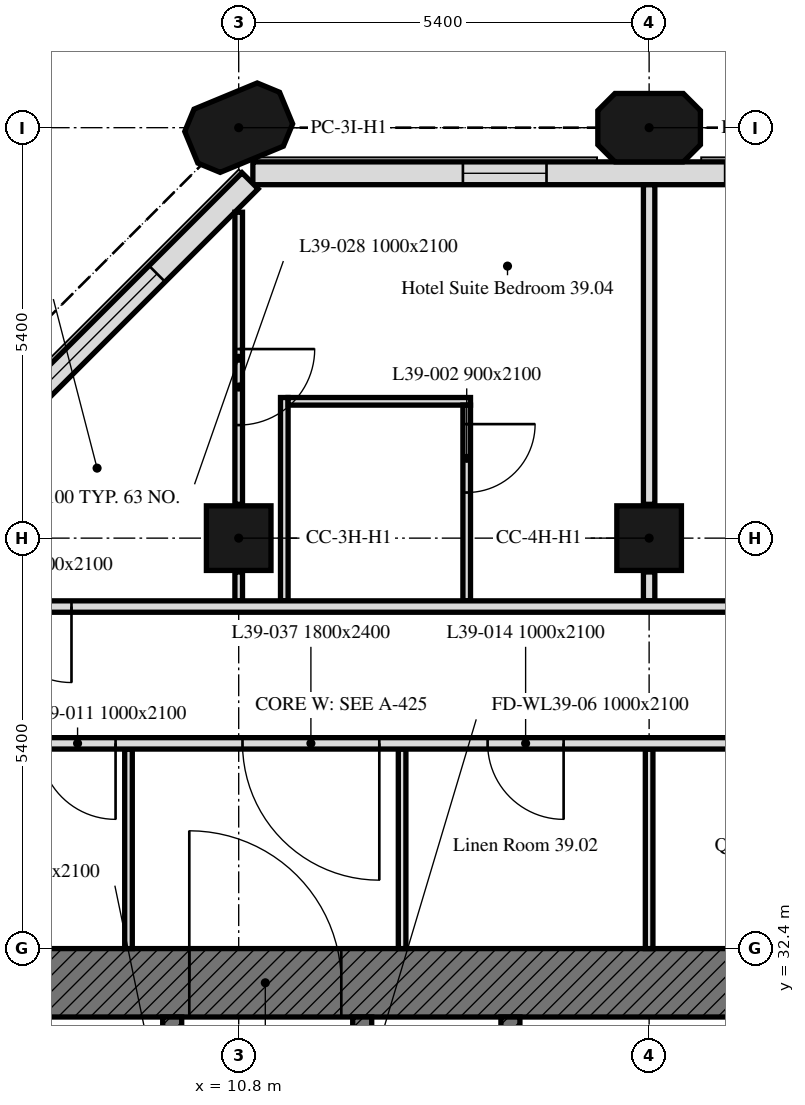
"""IFC4 building model, lengths in metres.
Left out: names, types, materials, properties, quantities, classifications, styles, units other than length and angle.
Written with IfcOpenShell. Run it as: python <this file> out.ifc"""

import sys

from ifc_helpers import new_model, si_unit, direction, frame, frame_2d, origin, origin_2d, place, context, subcontext, project, spatial, polyline, rectangle, outline, extrude, element, fill, save


model = new_model("IFC4")
c1 = context("Model", 3, precision=1e-05, world=origin(), true_north=direction((0.0, 1.0)))
c2 = subcontext(c1, "Body", "Model", "MODEL_VIEW")
j1 = project(units=[si_unit("LENGTHUNIT", "METRE"), si_unit("PLANEANGLEUNIT", "RADIAN")], contexts=[c1])
p1 = place(None, origin())
s1 = spatial("IfcSite", under=j1, at=p1, CompositionType="ELEMENT")
p2 = place(p1, origin())
s2 = spatial("IfcBuilding", under=s1, at=p2, CompositionType="ELEMENT")
p3 = place(p2, frame((0.0, 0.0, 166.0)))
s3 = spatial("IfcBuildingStorey", under=s2, at=p3, CompositionType="ELEMENT", Elevation=166.0)
for number, where, z_axis, x_axis in (
    (1, (10.8, 37.8, 0.0), (0.0, 0.0, 1.0), (1.0, 0.0, 0.0)),
    (2, (16.2, 37.8, 0.0), (0.0, 0.0, 1.0), (1.0, 0.0, 0.0)),
):
    element("IfcColumn", number, at=place(p3, frame(where, z_axis=z_axis, x_axis=x_axis)), inside=s3, PredefinedType="COLUMN", context=c2, shape_type="SweptSolid", body=[
        extrude(rectangle(XDim=0.85, YDim=0.85, at=origin_2d()), origin(), (0.0, 0.0, 1.0), 3.0),
    ])
for number, where, z_axis, x_axis in (
    (3, (10.8, 43.2, 0.0), (0.0, 0.0, 1.0), (0.924, 0.383, 0.0)),
    (4, (16.2, 43.2, 0.0), (0.0, 0.0, 1.0), (1.0, 0.0, 0.0)),
):
    element("IfcColumn", number, at=place(p3, frame(where, z_axis=z_axis, x_axis=x_axis)), inside=s3, PredefinedType="COLUMN", context=c2, shape_type="SweptSolid", body=[
        extrude(outline(polyline([(-0.45, -0.45), (0.45, -0.45), (0.675, -0.225), (0.675, 0.225), (0.45, 0.45), (-0.45, 0.45), (-0.675, 0.225), (-0.675, -0.225), (-0.45, -0.45)])), origin(), (0.0, 0.0, 1.0), 3.0),
    ])
p4 = place(p3, frame((43.014, 42.6, 0.0), z_axis=(0.0, 0.0, 1.0), x_axis=(-1.0, 0.0, 0.0)))
e5 = element("IfcWall", 5, at=p4, inside=s3, PredefinedType="SOLIDWALL", context=c2, shape_type="SweptSolid", body=[
    extrude(rectangle(XDim=32.027, YDim=0.3, at=frame_2d((16.014, 0.0))), origin(), (0.0, 0.0, 1.0), 3.0),
])
p5 = place(p4, frame((0.814, 0.0, 0.9)))
e6 = element("IfcOpeningElement", 6, at=p5, cuts=e5, PredefinedType="OPENING", context=c2, shape_type="SweptSolid", body=[
    extrude(rectangle(XDim=3.4, YDim=1.7, at=frame_2d((1.7, 0.85))), frame((0.0, 0.16, 0.0), z_axis=(0.0, -1.0, 0.0), x_axis=(1.0, 0.0, 0.0)), (0.0, 0.0, 1.0), 0.32),
])
p6 = place(p4, frame((6.564, 0.0, 0.9)))
e7 = element("IfcOpeningElement", 7, at=p6, cuts=e5, PredefinedType="OPENING", context=c2, shape_type="SweptSolid", body=[
    extrude(rectangle(XDim=1.1, YDim=1.7, at=frame_2d((0.55, 0.85))), frame((0.0, 0.16, 0.0), z_axis=(0.0, -1.0, 0.0), x_axis=(1.0, 0.0, 0.0)), (0.0, 0.0, 1.0), 0.32),
])
p7 = place(p4, frame((11.614, 0.0, 0.9)))
e8 = element("IfcOpeningElement", 8, at=p7, cuts=e5, PredefinedType="OPENING", context=c2, shape_type="SweptSolid", body=[
    extrude(rectangle(XDim=3.4, YDim=1.7, at=frame_2d((1.7, 0.85))), frame((0.0, 0.16, 0.0), z_axis=(0.0, -1.0, 0.0), x_axis=(1.0, 0.0, 0.0)), (0.0, 0.0, 1.0), 0.32),
])
p8 = place(p4, frame((17.364, 0.0, 0.9)))
e9 = element("IfcOpeningElement", 9, at=p8, cuts=e5, PredefinedType="OPENING", context=c2, shape_type="SweptSolid", body=[
    extrude(rectangle(XDim=1.1, YDim=1.7, at=frame_2d((0.55, 0.85))), frame((0.0, 0.16, 0.0), z_axis=(0.0, -1.0, 0.0), x_axis=(1.0, 0.0, 0.0)), (0.0, 0.0, 1.0), 0.32),
])
p9 = place(p4, frame((22.414, 0.0, 0.9)))
e10 = element("IfcOpeningElement", 10, at=p9, cuts=e5, PredefinedType="OPENING", context=c2, shape_type="SweptSolid", body=[
    extrude(rectangle(XDim=3.4, YDim=1.7, at=frame_2d((1.7, 0.85))), frame((0.0, 0.16, 0.0), z_axis=(0.0, -1.0, 0.0), x_axis=(1.0, 0.0, 0.0)), (0.0, 0.0, 1.0), 0.32),
])
p10 = place(p4, frame((28.164, 0.0, 0.9)))
e11 = element("IfcOpeningElement", 11, at=p10, cuts=e5, PredefinedType="OPENING", context=c2, shape_type="SweptSolid", body=[
    extrude(rectangle(XDim=1.1, YDim=1.7, at=frame_2d((0.55, 0.85))), frame((0.0, 0.16, 0.0), z_axis=(0.0, -1.0, 0.0), x_axis=(1.0, 0.0, 0.0)), (0.0, 0.0, 1.0), 0.32),
])
p11 = place(p3, frame((10.949, 42.501, 0.0), z_axis=(0.0, 0.0, 1.0), x_axis=(-0.707106781187, -0.707106781187, 0.0)))
e12 = element("IfcWall", 12, at=p11, inside=s3, PredefinedType="SOLIDWALL", context=c2, shape_type="SweptSolid", body=[
    extrude(rectangle(XDim=6.86, YDim=0.3, at=frame_2d((3.43, 0.0))), origin(), (0.0, 0.0, 1.0), 3.0),
])
p12 = place(p11, frame((1.73, 0.0, 0.9)))
e13 = element("IfcOpeningElement", 13, at=p12, cuts=e12, PredefinedType="OPENING", context=c2, shape_type="SweptSolid", body=[
    extrude(rectangle(XDim=3.4, YDim=1.7, at=frame_2d((1.7, 0.85))), frame((0.0, 0.16, 0.0), z_axis=(0.0, -1.0, 0.0), x_axis=(1.0, 0.0, 0.0)), (0.0, 0.0, 1.0), 0.32),
])
p13 = place(p3, frame((6.6, 31.95, 0.0), z_axis=(0.0, 0.0, 1.0), x_axis=(1.0, 0.0, 0.0)))
e14 = element("IfcWall", 14, at=p13, inside=s3, PredefinedType="SOLIDWALL", context=c2, shape_type="SweptSolid", body=[
    extrude(rectangle(XDim=11.1, YDim=0.9, at=frame_2d((5.55, 0.0))), origin(), (0.0, 0.0, 1.0), 3.0),
])
p14 = place(p13, frame((3.55, 0.0, 0.0)))
e15 = element("IfcOpeningElement", 15, at=p14, cuts=e14, PredefinedType="OPENING", context=c2, shape_type="SweptSolid", body=[
    extrude(rectangle(XDim=2.0, YDim=2.4, at=frame_2d((1.0, 1.2))), frame((0.0, 0.45, 0.0), z_axis=(0.0, -1.0, 0.0), x_axis=(1.0, 0.0, 0.0)), (0.0, 0.0, 1.0), 0.9),
])
p15 = place(p3, frame((9.925, 17.1, 0.0), z_axis=(0.0, 0.0, 1.0), x_axis=(0.0, 1.0, 0.0)))
e16 = element("IfcWall", 16, at=p15, inside=s3, PredefinedType="SOLIDWALL", context=c2, shape_type="SweptSolid", body=[
    extrude(rectangle(XDim=14.4, YDim=0.25, at=frame_2d((7.2, 0.0))), origin(), (0.0, 0.0, 1.0), 3.0),
])
p16 = place(p15, frame((4.6, 0.0, 0.0)))
e17 = element("IfcOpeningElement", 17, at=p16, cuts=e16, PredefinedType="OPENING", context=c2, shape_type="SweptSolid", body=[
    extrude(rectangle(XDim=1.0, YDim=2.1, at=frame_2d((0.5, 1.05))), frame((0.0, 0.125, 0.0), z_axis=(0.0, -1.0, 0.0), x_axis=(1.0, 0.0, 0.0)), (0.0, 0.0, 1.0), 0.25),
])
p17 = place(p15, frame((7.062, 0.0, 0.0)))
e18 = element("IfcOpeningElement", 18, at=p17, cuts=e16, PredefinedType="OPENING", context=c2, shape_type="SweptSolid", body=[
    extrude(rectangle(XDim=1.2, YDim=2.1, at=frame_2d((0.6, 1.05))), frame((0.0, 0.125, 0.0), z_axis=(0.0, -1.0, 0.0), x_axis=(1.0, 0.0, 0.0)), (0.0, 0.0, 1.0), 0.25),
])
p18 = place(p15, frame((10.106, 0.0, 0.0)))
e19 = element("IfcOpeningElement", 19, at=p18, cuts=e16, PredefinedType="OPENING", context=c2, shape_type="SweptSolid", body=[
    extrude(rectangle(XDim=0.9, YDim=2.1, at=frame_2d((0.45, 1.05))), frame((0.0, 0.125, 0.0), z_axis=(0.0, -1.0, 0.0), x_axis=(1.0, 0.0, 0.0)), (0.0, 0.0, 1.0), 0.25),
])
p19 = place(p15, frame((12.048, 0.0, 0.0)))
e20 = element("IfcOpeningElement", 20, at=p19, cuts=e16, PredefinedType="OPENING", context=c2, shape_type="SweptSolid", body=[
    extrude(rectangle(XDim=0.9, YDim=2.1, at=frame_2d((0.45, 1.05))), frame((0.0, 0.125, 0.0), z_axis=(0.0, -1.0, 0.0), x_axis=(1.0, 0.0, 0.0)), (0.0, 0.0, 1.0), 0.25),
])
p20 = place(p15, frame((13.354, 0.0, 0.0)))
e21 = element("IfcOpeningElement", 21, at=p20, cuts=e16, PredefinedType="OPENING", context=c2, shape_type="SweptSolid", body=[
    extrude(rectangle(XDim=0.9, YDim=2.1, at=frame_2d((0.45, 1.05))), frame((0.0, 0.125, 0.0), z_axis=(0.0, -1.0, 0.0), x_axis=(1.0, 0.0, 0.0)), (0.0, 0.0, 1.0), 0.25),
])
p21 = place(p3, frame((14.375, 17.1, 0.0), z_axis=(0.0, 0.0, 1.0), x_axis=(0.0, 1.0, 0.0)))
e22 = element("IfcWall", 22, at=p21, inside=s3, PredefinedType="SOLIDWALL", context=c2, shape_type="SweptSolid", body=[
    extrude(rectangle(XDim=14.4, YDim=0.25, at=frame_2d((7.2, 0.0))), origin(), (0.0, 0.0, 1.0), 3.0),
])
p22 = place(p21, frame((13.15, 0.0, 0.0)))
e23 = element("IfcOpeningElement", 23, at=p22, cuts=e22, PredefinedType="OPENING", context=c2, shape_type="SweptSolid", body=[
    extrude(rectangle(XDim=1.0, YDim=2.1, at=frame_2d((0.5, 1.05))), frame((0.0, 0.125, 0.0), z_axis=(0.0, -1.0, 0.0), x_axis=(1.0, 0.0, 0.0)), (0.0, 0.0, 1.0), 0.25),
])
p23 = place(p21, frame((0.6, 0.0, 0.0)))
e24 = element("IfcOpeningElement", 24, at=p23, cuts=e22, PredefinedType="OPENING", context=c2, shape_type="SweptSolid", body=[
    extrude(rectangle(XDim=1.1, YDim=2.1, at=frame_2d((0.55, 1.05))), frame((0.0, 0.125, 0.0), z_axis=(0.0, -1.0, 0.0), x_axis=(1.0, 0.0, 0.0)), (0.0, 0.0, 1.0), 0.25),
])
p24 = place(p21, frame((3.25, 0.0, 0.0)))
e25 = element("IfcOpeningElement", 25, at=p24, cuts=e22, PredefinedType="OPENING", context=c2, shape_type="SweptSolid", body=[
    extrude(rectangle(XDim=0.9, YDim=2.1, at=frame_2d((0.45, 1.05))), frame((0.0, 0.125, 0.0), z_axis=(0.0, -1.0, 0.0), x_axis=(1.0, 0.0, 0.0)), (0.0, 0.0, 1.0), 0.25),
])
p25 = place(p3, frame((12.425, 29.4, 0.0), z_axis=(0.0, 0.0, 1.0), x_axis=(0.0, 1.0, 0.0)))
e26 = element("IfcWall", 26, at=p25, inside=s3, PredefinedType="SOLIDWALL", context=c2, shape_type="SweptSolid", body=[
    extrude(rectangle(XDim=2.1, YDim=0.25, at=frame_2d((1.05, 0.0))), origin(), (0.0, 0.0, 1.0), 3.0),
])
p26 = place(p25, frame((0.5, 0.0, 0.0)))
e27 = element("IfcOpeningElement", 27, at=p26, cuts=e26, PredefinedType="OPENING", context=c2, shape_type="SweptSolid", body=[
    extrude(rectangle(XDim=1.0, YDim=2.1, at=frame_2d((0.5, 1.05))), frame((0.0, 0.125, 0.0), z_axis=(0.0, -1.0, 0.0), x_axis=(1.0, 0.0, 0.0)), (0.0, 0.0, 1.0), 0.25),
])
p27 = place(p3, frame((10.8, 42.088, 0.0), z_axis=(0.0, 0.0, 1.0), x_axis=(0.0, -1.0, 0.0)))
e28 = element("IfcWall", 28, at=p27, inside=s3, PredefinedType="PARTITIONING", context=c2, shape_type="SweptSolid", body=[
    extrude(rectangle(XDim=3.843, YDim=0.1, at=frame_2d((1.921, 0.0))), origin(), (0.0, 0.0, 1.0), 3.0),
])
p28 = place(p27, frame((1.8, 0.0, 0.0)))
e29 = element("IfcOpeningElement", 29, at=p28, cuts=e28, PredefinedType="OPENING", context=c2, shape_type="SweptSolid", body=[
    extrude(rectangle(XDim=1.0, YDim=2.1, at=frame_2d((0.5, 1.05))), frame((0.0, 0.05, 0.0), z_axis=(0.0, -1.0, 0.0), x_axis=(1.0, 0.0, 0.0)), (0.0, 0.0, 1.0), 0.1),
])
p29 = place(p3, frame((10.8, 37.355, 0.0), z_axis=(0.0, 0.0, 1.0), x_axis=(0.0, -1.0, 0.0)))
e30 = element("IfcWall", 30, at=p29, inside=s3, PredefinedType="PARTITIONING", context=c2, shape_type="SweptSolid", body=[
    extrude(rectangle(XDim=0.38, YDim=0.1, at=frame_2d((0.19, 0.0))), origin(), (0.0, 0.0, 1.0), 3.0),
])
p30 = place(p3, frame((11.4, 36.975, 0.0), z_axis=(0.0, 0.0, 1.0), x_axis=(0.0, 1.0, 0.0)))
e31 = element("IfcWall", 31, at=p30, inside=s3, PredefinedType="PARTITIONING", context=c2, shape_type="SweptSolid", body=[
    extrude(rectangle(XDim=2.675, YDim=0.1, at=frame_2d((1.337, 0.0))), origin(), (0.0, 0.0, 1.0), 3.0),
])
p31 = place(p3, frame((11.45, 39.6, 0.0), z_axis=(0.0, 0.0, 1.0), x_axis=(1.0, 0.0, 0.0)))
e32 = element("IfcWall", 32, at=p31, inside=s3, PredefinedType="PARTITIONING", context=c2, shape_type="SweptSolid", body=[
    extrude(rectangle(XDim=2.4, YDim=0.1, at=frame_2d((1.2, 0.0))), origin(), (0.0, 0.0, 1.0), 3.0),
])
p32 = place(p3, frame((13.8, 39.55, 0.0), z_axis=(0.0, 0.0, 1.0), x_axis=(0.0, -1.0, 0.0)))
e33 = element("IfcWall", 33, at=p32, inside=s3, PredefinedType="PARTITIONING", context=c2, shape_type="SweptSolid", body=[
    extrude(rectangle(XDim=2.575, YDim=0.1, at=frame_2d((1.288, 0.0))), origin(), (0.0, 0.0, 1.0), 3.0),
])
p33 = place(p32, frame((0.25, 0.0, 0.0)))
e34 = element("IfcOpeningElement", 34, at=p33, cuts=e33, PredefinedType="OPENING", context=c2, shape_type="SweptSolid", body=[
    extrude(rectangle(XDim=0.9, YDim=2.1, at=frame_2d((0.45, 1.05))), frame((0.0, 0.05, 0.0), z_axis=(0.0, -1.0, 0.0), x_axis=(1.0, 0.0, 0.0)), (0.0, 0.0, 1.0), 0.1),
])
p34 = place(p3, frame((16.2, 36.975, 0.0), z_axis=(0.0, 0.0, 1.0), x_axis=(0.0, 1.0, 0.0)))
e35 = element("IfcWall", 35, at=p34, inside=s3, PredefinedType="PARTITIONING", context=c2, shape_type="SweptSolid", body=[
    extrude(rectangle(XDim=0.38, YDim=0.15, at=frame_2d((0.19, 0.0))), origin(), (0.0, 0.0, 1.0), 3.0),
])
p35 = place(p3, frame((16.2, 38.245, 0.0), z_axis=(0.0, 0.0, 1.0), x_axis=(0.0, 1.0, 0.0)))
e36 = element("IfcWall", 36, at=p35, inside=s3, PredefinedType="PARTITIONING", context=c2, shape_type="SweptSolid", body=[
    extrude(rectangle(XDim=4.204, YDim=0.15, at=frame_2d((2.102, 0.0))), origin(), (0.0, 0.0, 1.0), 3.0),
])
p36 = place(p3, frame((47.849, 36.9, 0.0), z_axis=(0.0, 0.0, 1.0), x_axis=(-1.0, 0.0, 0.0)))
e37 = element("IfcWall", 37, at=p36, inside=s3, PredefinedType="PARTITIONING", context=c2, shape_type="SweptSolid", body=[
    extrude(rectangle(XDim=41.698, YDim=0.15, at=frame_2d((20.849, 0.0))), origin(), (0.0, 0.0, 1.0), 3.0),
])
p37 = place(p36, frame((39.249, 0.0, 0.0)))
e38 = element("IfcOpeningElement", 38, at=p37, cuts=e37, PredefinedType="OPENING", context=c2, shape_type="SweptSolid", body=[
    extrude(rectangle(XDim=1.0, YDim=2.1, at=frame_2d((0.5, 1.05))), frame((0.0, 0.075, 0.0), z_axis=(0.0, -1.0, 0.0), x_axis=(1.0, 0.0, 0.0)), (0.0, 0.0, 1.0), 0.15),
])
p38 = place(p36, frame((28.449, 0.0, 0.0)))
e39 = element("IfcOpeningElement", 39, at=p38, cuts=e37, PredefinedType="OPENING", context=c2, shape_type="SweptSolid", body=[
    extrude(rectangle(XDim=1.0, YDim=2.1, at=frame_2d((0.5, 1.05))), frame((0.0, 0.075, 0.0), z_axis=(0.0, -1.0, 0.0), x_axis=(1.0, 0.0, 0.0)), (0.0, 0.0, 1.0), 0.15),
])
p39 = place(p36, frame((16.849, 0.0, 0.0)))
e40 = element("IfcOpeningElement", 40, at=p39, cuts=e37, PredefinedType="OPENING", context=c2, shape_type="SweptSolid", body=[
    extrude(rectangle(XDim=1.0, YDim=2.1, at=frame_2d((0.5, 1.05))), frame((0.0, 0.075, 0.0), z_axis=(0.0, -1.0, 0.0), x_axis=(1.0, 0.0, 0.0)), (0.0, 0.0, 1.0), 0.15),
])
p40 = place(p36, frame((11.449, 0.0, 0.0)))
e41 = element("IfcOpeningElement", 41, at=p40, cuts=e37, PredefinedType="OPENING", context=c2, shape_type="SweptSolid", body=[
    extrude(rectangle(XDim=1.0, YDim=2.1, at=frame_2d((0.5, 1.05))), frame((0.0, 0.075, 0.0), z_axis=(0.0, -1.0, 0.0), x_axis=(1.0, 0.0, 0.0)), (0.0, 0.0, 1.0), 0.15),
])
p41 = place(p36, frame((2.744, 0.0, 0.0)))
e42 = element("IfcOpeningElement", 42, at=p41, cuts=e37, PredefinedType="OPENING", context=c2, shape_type="SweptSolid", body=[
    extrude(rectangle(XDim=1.0, YDim=2.1, at=frame_2d((0.5, 1.05))), frame((0.0, 0.075, 0.0), z_axis=(0.0, -1.0, 0.0), x_axis=(1.0, 0.0, 0.0)), (0.0, 0.0, 1.0), 0.15),
])
for number, where, z_axis, x_axis in (
    (43, (16.2, 35.025, 0.0), (0.0, 0.0, 1.0), (0.0, -1.0, 0.0)),
    (44, (9.35, 35.025, 0.0), (0.0, 0.0, 1.0), (0.0, -1.0, 0.0)),
    (45, (12.95, 32.4, 0.0), (0.0, 0.0, 1.0), (0.0, 1.0, 0.0)),
):
    element("IfcWall", number, at=place(p3, frame(where, z_axis=z_axis, x_axis=x_axis)), inside=s3, PredefinedType="PARTITIONING", context=c2, shape_type="SweptSolid", body=[
        extrude(rectangle(XDim=2.625, YDim=0.1, at=frame_2d((1.312, 0.0))), origin(), (0.0, 0.0, 1.0), 3.0),
    ])
p42 = place(p3, frame((43.275, 35.1, 0.0), z_axis=(0.0, 0.0, 1.0), x_axis=(-1.0, 0.0, 0.0)))
e46 = element("IfcWall", 46, at=p42, inside=s3, PredefinedType="PARTITIONING", context=c2, shape_type="SweptSolid", body=[
    extrude(rectangle(XDim=37.124, YDim=0.15, at=frame_2d((18.562, 0.0))), origin(), (0.0, 0.0, 1.0), 3.0),
])
p43 = place(p42, frame((24.775, 0.0, 0.0)))
e47 = element("IfcOpeningElement", 47, at=p43, cuts=e46, PredefinedType="OPENING", context=c2, shape_type="SweptSolid", body=[
    extrude(rectangle(XDim=1.0, YDim=2.1, at=frame_2d((0.5, 1.05))), frame((0.0, 0.075, 0.0), z_axis=(0.0, -1.0, 0.0), x_axis=(1.0, 0.0, 0.0)), (0.0, 0.0, 1.0), 0.15),
])
p44 = place(p42, frame((18.475, 0.0, 0.0)))
e48 = element("IfcOpeningElement", 48, at=p44, cuts=e46, PredefinedType="OPENING", context=c2, shape_type="SweptSolid", body=[
    extrude(rectangle(XDim=1.0, YDim=2.1, at=frame_2d((0.5, 1.05))), frame((0.0, 0.075, 0.0), z_axis=(0.0, -1.0, 0.0), x_axis=(1.0, 0.0, 0.0)), (0.0, 0.0, 1.0), 0.15),
])
p45 = place(p42, frame((13.525, 0.0, 0.0)))
e49 = element("IfcOpeningElement", 49, at=p45, cuts=e46, PredefinedType="OPENING", context=c2, shape_type="SweptSolid", body=[
    extrude(rectangle(XDim=1.0, YDim=2.1, at=frame_2d((0.5, 1.05))), frame((0.0, 0.075, 0.0), z_axis=(0.0, -1.0, 0.0), x_axis=(1.0, 0.0, 0.0)), (0.0, 0.0, 1.0), 0.15),
])
p46 = place(p42, frame((34.095, 0.0, 0.0)))
e50 = element("IfcOpeningElement", 50, at=p46, cuts=e46, PredefinedType="OPENING", context=c2, shape_type="SweptSolid", body=[
    extrude(rectangle(XDim=1.0, YDim=2.1, at=frame_2d((0.5, 1.05))), frame((0.0, 0.075, 0.0), z_axis=(0.0, -1.0, 0.0), x_axis=(1.0, 0.0, 0.0)), (0.0, 0.0, 1.0), 0.15),
])
p47 = place(p42, frame((8.75, 0.0, 0.0)))
e51 = element("IfcOpeningElement", 51, at=p47, cuts=e46, PredefinedType="OPENING", context=c2, shape_type="SweptSolid", body=[
    extrude(rectangle(XDim=1.0, YDim=2.1, at=frame_2d((0.5, 1.05))), frame((0.0, 0.075, 0.0), z_axis=(0.0, -1.0, 0.0), x_axis=(1.0, 0.0, 0.0)), (0.0, 0.0, 1.0), 0.15),
])
p48 = place(p42, frame((1.55, 0.0, 0.0)))
e52 = element("IfcOpeningElement", 52, at=p48, cuts=e46, PredefinedType="OPENING", context=c2, shape_type="SweptSolid", body=[
    extrude(rectangle(XDim=1.0, YDim=2.1, at=frame_2d((0.5, 1.05))), frame((0.0, 0.075, 0.0), z_axis=(0.0, -1.0, 0.0), x_axis=(1.0, 0.0, 0.0)), (0.0, 0.0, 1.0), 0.15),
])
p49 = place(p42, frame((28.2, 0.0, 0.0)))
e53 = element("IfcOpeningElement", 53, at=p49, cuts=e46, PredefinedType="OPENING", context=c2, shape_type="SweptSolid", body=[
    extrude(rectangle(XDim=1.0, YDim=2.1, at=frame_2d((0.5, 1.05))), frame((0.0, 0.075, 0.0), z_axis=(0.0, -1.0, 0.0), x_axis=(1.0, 0.0, 0.0)), (0.0, 0.0, 1.0), 0.15),
])
p50 = place(p42, frame((30.625, 0.0, 0.0)))
e54 = element("IfcOpeningElement", 54, at=p50, cuts=e46, PredefinedType="OPENING", context=c2, shape_type="SweptSolid", body=[
    extrude(rectangle(XDim=1.8, YDim=2.4, at=frame_2d((0.9, 1.2))), frame((0.0, 0.075, 0.0), z_axis=(0.0, -1.0, 0.0), x_axis=(1.0, 0.0, 0.0)), (0.0, 0.0, 1.0), 0.15),
])
p51 = place(p42, frame((5.525, 0.0, 0.0)))
e55 = element("IfcOpeningElement", 55, at=p51, cuts=e46, PredefinedType="OPENING", context=c2, shape_type="SweptSolid", body=[
    extrude(rectangle(XDim=1.8, YDim=2.4, at=frame_2d((0.9, 1.2))), frame((0.0, 0.075, 0.0), z_axis=(0.0, -1.0, 0.0), x_axis=(1.0, 0.0, 0.0)), (0.0, 0.0, 1.0), 0.15),
])
p52 = place(p10, origin())
e56 = element("IfcWindow", 56, at=p52, inside=s3, PartitioningType="SINGLE_PANEL", PredefinedType="WINDOW", context=c2, shape_type="SweptSolid", body=[
    extrude(rectangle(XDim=1.1, YDim=1.7, at=frame_2d((0.55, 0.85))), frame((0.0, 0.03, 0.0), z_axis=(0.0, -1.0, 0.0), x_axis=(1.0, 0.0, 0.0)), (0.0, 0.0, 1.0), 0.06),
])
fill(e11, e56)
p53 = place(p12, origin())
e57 = element("IfcWindow", 57, at=p53, inside=s3, PartitioningType="SINGLE_PANEL", PredefinedType="WINDOW", context=c2, shape_type="SweptSolid", body=[
    extrude(rectangle(XDim=3.4, YDim=1.7, at=frame_2d((1.7, 0.85))), frame((0.0, 0.03, 0.0), z_axis=(0.0, -1.0, 0.0), x_axis=(1.0, 0.0, 0.0)), (0.0, 0.0, 1.0), 0.06),
])
fill(e13, e57)
p54 = place(p14, origin())
e58 = element("IfcDoor", 58, at=p54, inside=s3, OperationType="DOUBLE_DOOR_SINGLE_SWING", PredefinedType="DOOR", context=c2, shape_type="SweptSolid", body=[
    extrude(rectangle(XDim=2.0, YDim=2.4, at=frame_2d((1.0, 1.2))), frame((0.0, 0.025, 0.0), z_axis=(0.0, -1.0, 0.0), x_axis=(1.0, 0.0, 0.0)), (0.0, 0.0, 1.0), 0.05),
])
fill(e15, e58)
p55 = place(p33, origin())
e59 = element("IfcDoor", 59, at=p55, inside=s3, OperationType="SINGLE_SWING_RIGHT", PredefinedType="DOOR", context=c2, shape_type="SweptSolid", body=[
    extrude(rectangle(XDim=0.9, YDim=2.1, at=frame_2d((0.45, 1.05))), frame((0.0, 0.025, 0.0), z_axis=(0.0, -1.0, 0.0), x_axis=(1.0, 0.0, 0.0)), (0.0, 0.0, 1.0), 0.05),
])
fill(e34, e59)
p56 = place(p46, origin())
e60 = element("IfcDoor", 60, at=p56, inside=s3, OperationType="SINGLE_SWING_RIGHT", PredefinedType="DOOR", context=c2, shape_type="SweptSolid", body=[
    extrude(rectangle(XDim=1.0, YDim=2.1, at=frame_2d((0.5, 1.05))), frame((0.0, 0.025, 0.0), z_axis=(0.0, -1.0, 0.0), x_axis=(1.0, 0.0, 0.0)), (0.0, 0.0, 1.0), 0.05),
])
fill(e50, e60)
p57 = place(p49, origin())
e61 = element("IfcDoor", 61, at=p57, inside=s3, OperationType="SINGLE_SWING_LEFT", PredefinedType="DOOR", context=c2, shape_type="SweptSolid", body=[
    extrude(rectangle(XDim=1.0, YDim=2.1, at=frame_2d((0.5, 1.05))), frame((0.0, 0.025, 0.0), z_axis=(0.0, -1.0, 0.0), x_axis=(1.0, 0.0, 0.0)), (0.0, 0.0, 1.0), 0.05),
])
fill(e53, e61)
p58 = place(p28, origin())
e62 = element("IfcDoor", 62, at=p58, inside=s3, OperationType="SINGLE_SWING_RIGHT", PredefinedType="DOOR", context=c2, shape_type="SweptSolid", body=[
    extrude(rectangle(XDim=1.0, YDim=2.1, at=frame_2d((0.5, 1.05))), frame((0.0, 0.025, 0.0), z_axis=(0.0, -1.0, 0.0), x_axis=(1.0, 0.0, 0.0)), (0.0, 0.0, 1.0), 0.05),
])
fill(e29, e62)
p59 = place(p37, origin())
e63 = element("IfcDoor", 63, at=p59, inside=s3, OperationType="SINGLE_SWING_LEFT", PredefinedType="DOOR", context=c2, shape_type="SweptSolid", body=[
    extrude(rectangle(XDim=1.0, YDim=2.1, at=frame_2d((0.5, 1.05))), frame((0.0, 0.025, 0.0), z_axis=(0.0, -1.0, 0.0), x_axis=(1.0, 0.0, 0.0)), (0.0, 0.0, 1.0), 0.05),
])
fill(e38, e63)
p60 = place(p50, origin())
e64 = element("IfcDoor", 64, at=p60, inside=s3, OperationType="DOUBLE_DOOR_SINGLE_SWING", PredefinedType="DOOR", context=c2, shape_type="SweptSolid", body=[
    extrude(rectangle(XDim=1.8, YDim=2.4, at=frame_2d((0.9, 1.2))), frame((0.0, 0.025, 0.0), z_axis=(0.0, -1.0, 0.0), x_axis=(1.0, 0.0, 0.0)), (0.0, 0.0, 1.0), 0.05),
])
fill(e54, e64)
save(model, sys.argv[1])
